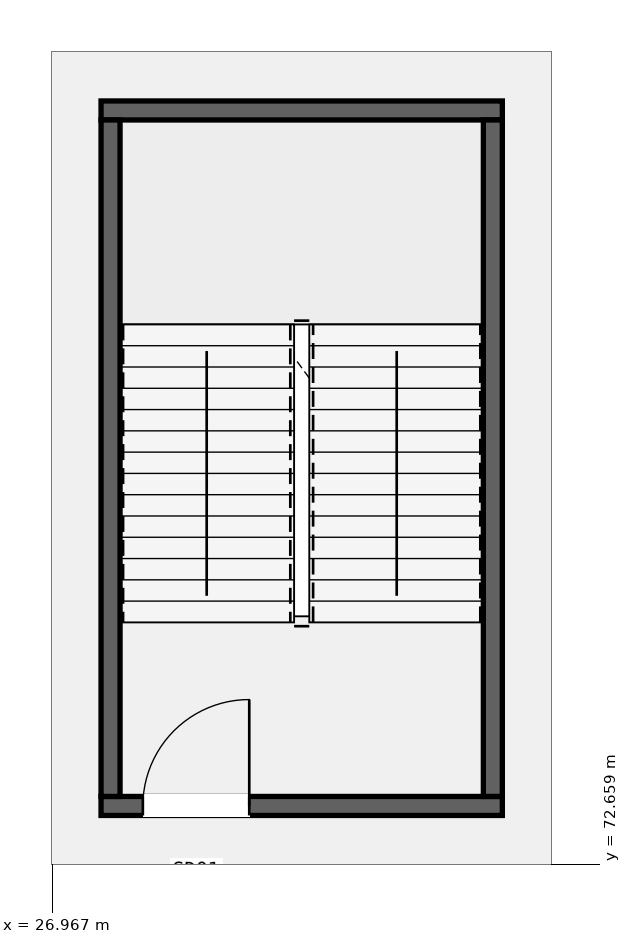
"""IFC4 building model, lengths in metres.
Left out: names, types, materials, properties, quantities, classifications, styles, units other than length and angle.
Written with IfcOpenShell. Run it as: python <this file> out.ifc"""

import sys

from ifc_helpers import new_model, si_unit, direction, frame, frame_2d, origin, place, context, subcontext, project, spatial, rectangle, extrude, element, fill, save


model = new_model("IFC4")
c1 = context("Model", 3, precision=1e-05, world=origin(), true_north=direction((0.0, 1.0)))
c2 = subcontext(c1, "Body", "Model", "MODEL_VIEW")
j1 = project(units=[si_unit("LENGTHUNIT", "METRE"), si_unit("PLANEANGLEUNIT", "RADIAN")], contexts=[c1])
p1 = place(None, origin())
s1 = spatial("IfcSite", under=j1, at=p1, CompositionType="ELEMENT")
p2 = place(p1, origin())
s2 = spatial("IfcBuilding", under=s1, at=p2, CompositionType="ELEMENT")
p3 = place(p2, frame((0.0, 0.0, 5.4)))
s3 = spatial("IfcBuildingStorey", under=s2, at=p3, CompositionType="ELEMENT", Elevation=5.4)
p4 = place(p3, frame((27.61, 73.425, 0.0), z_axis=(0.0, 0.0, 1.0), x_axis=(1.0, 0.0, 0.0)))
e1 = element("IfcWall", 1, at=p4, inside=s3, PredefinedType="SHEAR", context=c2, shape_type="SweptSolid", body=[
    extrude(rectangle(XDim=5.28, YDim=0.25, at=frame_2d((2.64, 0.0))), origin(), (0.0, 0.0, 1.0), 4.55),
])
p5 = place(p4, frame((0.55, 0.0, 0.0)))
e2 = element("IfcOpeningElement", 2, at=p5, cuts=e1, PredefinedType="OPENING", context=c2, shape_type="SweptSolid", body=[
    extrude(rectangle(XDim=1.4, YDim=2.15, at=frame_2d((0.7, 1.075))), frame((0.0, 0.135, 0.0), z_axis=(0.0, -1.0, 0.0), x_axis=(1.0, 0.0, 0.0)), (0.0, 0.0, 1.0), 0.27),
])
p6 = place(p3, frame((27.61, 82.575, 0.0), z_axis=(0.0, 0.0, 1.0), x_axis=(1.0, 0.0, 0.0)))
e3 = element("IfcWall", 3, at=p6, inside=s3, PredefinedType="SHEAR", context=c2, shape_type="SweptSolid", body=[
    extrude(rectangle(XDim=5.28, YDim=0.25, at=frame_2d((2.64, 0.0))), origin(), (0.0, 0.0, 1.0), 4.55),
])
for number, where, z_axis, x_axis in (
    (4, (27.735, 73.55, 0.0), (0.0, 0.0, 1.0), (0.0, 1.0, 0.0)),
    (5, (32.765, 73.55, 0.0), (0.0, 0.0, 1.0), (0.0, 1.0, 0.0)),
):
    element("IfcWall", number, at=place(p3, frame(where, z_axis=z_axis, x_axis=x_axis)), inside=s3, PredefinedType="SHEAR", context=c2, shape_type="SweptSolid", body=[
        extrude(rectangle(XDim=8.9, YDim=0.25, at=frame_2d((4.45, 0.0))), origin(), (0.0, 0.0, 1.0), 4.55),
    ])
p7 = place(p5, origin())
e6 = element("IfcDoor", 6, at=p7, inside=s3, OperationType="SINGLE_SWING_RIGHT", PredefinedType="DOOR", context=c2, shape_type="SweptSolid", body=[
    extrude(rectangle(XDim=1.4, YDim=2.15, at=frame_2d((0.7, 1.075))), frame((0.0, 0.025, 0.0), z_axis=(0.0, -1.0, 0.0), x_axis=(1.0, 0.0, 0.0)), (0.0, 0.0, 1.0), 0.05),
])
fill(e2, e6)
save(model, sys.argv[1])
